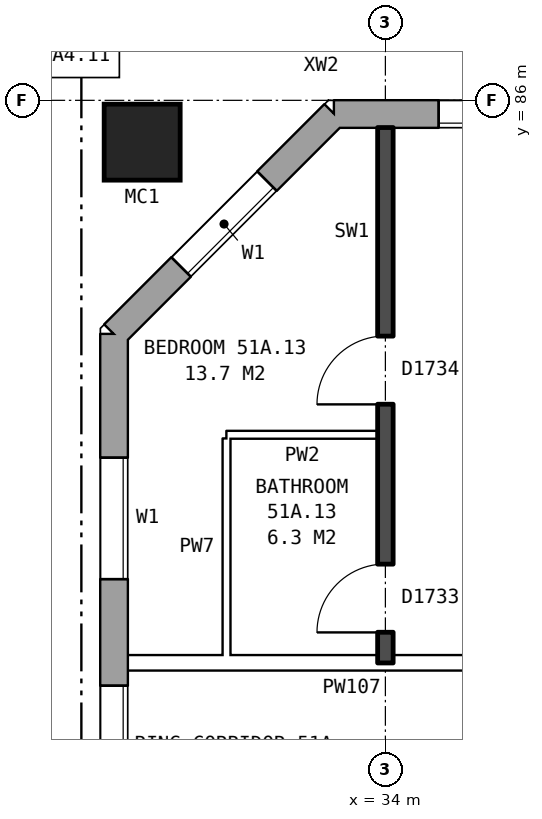
"""IFC4 building model, lengths in metres.
Left out: names, types, materials, properties, quantities, classifications, styles, units other than length and angle.
Written with IfcOpenShell. Run it as: python <this file> out.ifc"""

import sys

from ifc_helpers import new_model, si_unit, direction, frame, frame_2d, origin, origin_2d, place, context, subcontext, project, spatial, rectangle, hollow_rectangle, extrude, element, fill, save


model = new_model("IFC4")
c1 = context("Model", 3, precision=1e-05, world=origin(), true_north=direction((0.0, 1.0)))
c2 = subcontext(c1, "Body", "Model", "MODEL_VIEW")
j1 = project(units=[si_unit("LENGTHUNIT", "METRE"), si_unit("PLANEANGLEUNIT", "RADIAN")], contexts=[c1])
p1 = place(None, origin())
s1 = spatial("IfcSite", under=j1, at=p1, CompositionType="ELEMENT")
p2 = place(p1, origin())
s2 = spatial("IfcBuilding", under=s1, at=p2, CompositionType="ELEMENT")
p3 = place(p2, frame((0.0, 0.0, 182.0)))
s3 = spatial("IfcBuildingStorey", under=s2, at=p3, CompositionType="ELEMENT", Elevation=182.0)
p4 = place(p3, frame((30.8, 85.45, 0.0), z_axis=(0.0, 0.0, 1.0), x_axis=(1.0, 0.0, 0.0)))
e1 = element("IfcColumn", 1, at=p4, inside=s3, PredefinedType="COLUMN", context=c2, shape_type="SweptSolid", body=[
    extrude(hollow_rectangle(XDim=1.0, YDim=1.0, WallThickness=0.055, at=origin_2d()), origin(), (0.0, 0.0, 1.0), 3.1),
])
p5 = place(p3, frame((72.925, 85.82, 0.0), z_axis=(0.0, 0.0, 1.0), x_axis=(-1.0, 0.0, 0.0)))
e2 = element("IfcWall", 2, at=p5, inside=s3, PredefinedType="STANDARD", context=c2, shape_type="SweptSolid", body=[
    extrude(rectangle(XDim=39.601, YDim=0.36, at=frame_2d((19.8, 0.0))), origin(), (0.0, 0.0, 1.0), 2.85),
])
p6 = place(p5, frame((0.625, 0.0, 0.8)))
e3 = element("IfcOpeningElement", 3, at=p6, cuts=e2, PredefinedType="OPENING", context=c2, shape_type="SweptSolid", body=[
    extrude(rectangle(XDim=1.6, YDim=1.8, at=frame_2d((0.8, 0.9))), frame((0.0, 0.19, 0.0), z_axis=(0.0, -1.0, 0.0), x_axis=(1.0, 0.0, 0.0)), (0.0, 0.0, 1.0), 0.38),
])
p7 = place(p5, frame((3.625, 0.0, 0.8)))
e4 = element("IfcOpeningElement", 4, at=p7, cuts=e2, PredefinedType="OPENING", context=c2, shape_type="SweptSolid", body=[
    extrude(rectangle(XDim=1.6, YDim=1.8, at=frame_2d((0.8, 0.9))), frame((0.0, 0.19, 0.0), z_axis=(0.0, -1.0, 0.0), x_axis=(1.0, 0.0, 0.0)), (0.0, 0.0, 1.0), 0.38),
])
p8 = place(p5, frame((6.625, 0.0, 0.8)))
e5 = element("IfcOpeningElement", 5, at=p8, cuts=e2, PredefinedType="OPENING", context=c2, shape_type="SweptSolid", body=[
    extrude(rectangle(XDim=1.6, YDim=1.8, at=frame_2d((0.8, 0.9))), frame((0.0, 0.19, 0.0), z_axis=(0.0, -1.0, 0.0), x_axis=(1.0, 0.0, 0.0)), (0.0, 0.0, 1.0), 0.38),
])
p9 = place(p5, frame((9.475, 0.0, 0.35)))
e6 = element("IfcOpeningElement", 6, at=p9, cuts=e2, PredefinedType="OPENING", context=c2, shape_type="SweptSolid", body=[
    extrude(rectangle(XDim=0.6, YDim=0.9, at=frame_2d((0.3, 0.45))), frame((0.0, 0.19, 0.0), z_axis=(0.0, -1.0, 0.0), x_axis=(1.0, 0.0, 0.0)), (0.0, 0.0, 1.0), 0.38),
])
p10 = place(p5, frame((12.625, 0.0, 0.8)))
e7 = element("IfcOpeningElement", 7, at=p10, cuts=e2, PredefinedType="OPENING", context=c2, shape_type="SweptSolid", body=[
    extrude(rectangle(XDim=1.6, YDim=1.8, at=frame_2d((0.8, 0.9))), frame((0.0, 0.19, 0.0), z_axis=(0.0, -1.0, 0.0), x_axis=(1.0, 0.0, 0.0)), (0.0, 0.0, 1.0), 0.38),
])
p11 = place(p5, frame((15.625, 0.0, 0.8)))
e8 = element("IfcOpeningElement", 8, at=p11, cuts=e2, PredefinedType="OPENING", context=c2, shape_type="SweptSolid", body=[
    extrude(rectangle(XDim=1.6, YDim=1.8, at=frame_2d((0.8, 0.9))), frame((0.0, 0.19, 0.0), z_axis=(0.0, -1.0, 0.0), x_axis=(1.0, 0.0, 0.0)), (0.0, 0.0, 1.0), 0.38),
])
p12 = place(p5, frame((18.625, 0.0, 0.8)))
e9 = element("IfcOpeningElement", 9, at=p12, cuts=e2, PredefinedType="OPENING", context=c2, shape_type="SweptSolid", body=[
    extrude(rectangle(XDim=1.6, YDim=1.8, at=frame_2d((0.8, 0.9))), frame((0.0, 0.19, 0.0), z_axis=(0.0, -1.0, 0.0), x_axis=(1.0, 0.0, 0.0)), (0.0, 0.0, 1.0), 0.38),
])
p13 = place(p5, frame((21.625, 0.0, 0.8)))
e10 = element("IfcOpeningElement", 10, at=p13, cuts=e2, PredefinedType="OPENING", context=c2, shape_type="SweptSolid", body=[
    extrude(rectangle(XDim=1.6, YDim=1.8, at=frame_2d((0.8, 0.9))), frame((0.0, 0.19, 0.0), z_axis=(0.0, -1.0, 0.0), x_axis=(1.0, 0.0, 0.0)), (0.0, 0.0, 1.0), 0.38),
])
p14 = place(p5, frame((24.625, 0.0, 0.8)))
e11 = element("IfcOpeningElement", 11, at=p14, cuts=e2, PredefinedType="OPENING", context=c2, shape_type="SweptSolid", body=[
    extrude(rectangle(XDim=1.6, YDim=1.8, at=frame_2d((0.8, 0.9))), frame((0.0, 0.19, 0.0), z_axis=(0.0, -1.0, 0.0), x_axis=(1.0, 0.0, 0.0)), (0.0, 0.0, 1.0), 0.38),
])
p15 = place(p5, frame((27.125, 0.0, 0.8)))
e12 = element("IfcOpeningElement", 12, at=p15, cuts=e2, PredefinedType="OPENING", context=c2, shape_type="SweptSolid", body=[
    extrude(rectangle(XDim=1.6, YDim=1.8, at=frame_2d((0.8, 0.9))), frame((0.0, 0.19, 0.0), z_axis=(0.0, -1.0, 0.0), x_axis=(1.0, 0.0, 0.0)), (0.0, 0.0, 1.0), 0.38),
])
p16 = place(p5, frame((29.025, 0.0, 0.8)))
e13 = element("IfcOpeningElement", 13, at=p16, cuts=e2, PredefinedType="OPENING", context=c2, shape_type="SweptSolid", body=[
    extrude(rectangle(XDim=0.6, YDim=0.9, at=frame_2d((0.3, 0.45))), frame((0.0, 0.19, 0.0), z_axis=(0.0, -1.0, 0.0), x_axis=(1.0, 0.0, 0.0)), (0.0, 0.0, 1.0), 0.38),
])
p17 = place(p5, frame((33.625, 0.0, 0.8)))
e14 = element("IfcOpeningElement", 14, at=p17, cuts=e2, PredefinedType="OPENING", context=c2, shape_type="SweptSolid", body=[
    extrude(rectangle(XDim=1.6, YDim=1.8, at=frame_2d((0.8, 0.9))), frame((0.0, 0.19, 0.0), z_axis=(0.0, -1.0, 0.0), x_axis=(1.0, 0.0, 0.0)), (0.0, 0.0, 1.0), 0.38),
])
p18 = place(p5, frame((36.625, 0.0, 0.8)))
e15 = element("IfcOpeningElement", 15, at=p18, cuts=e2, PredefinedType="OPENING", context=c2, shape_type="SweptSolid", body=[
    extrude(rectangle(XDim=1.6, YDim=1.8, at=frame_2d((0.8, 0.9))), frame((0.0, 0.19, 0.0), z_axis=(0.0, -1.0, 0.0), x_axis=(1.0, 0.0, 0.0)), (0.0, 0.0, 1.0), 0.38),
])
p19 = place(p5, frame((10.375, 0.0, 0.35)))
e16 = element("IfcOpeningElement", 16, at=p19, cuts=e2, PredefinedType="OPENING", context=c2, shape_type="SweptSolid", body=[
    extrude(rectangle(XDim=1.4, YDim=1.8, at=frame_2d((0.7, 0.9))), frame((0.0, 0.19, 0.0), z_axis=(0.0, -1.0, 0.0), x_axis=(1.0, 0.0, 0.0)), (0.0, 0.0, 1.0), 0.38),
])
p20 = place(p5, frame((30.775, 0.0, 1.7)))
e17 = element("IfcOpeningElement", 17, at=p20, cuts=e2, PredefinedType="OPENING", context=c2, shape_type="SweptSolid", body=[
    extrude(rectangle(XDim=0.6, YDim=0.9, at=frame_2d((0.3, 0.45))), frame((0.0, 0.19, 0.0), z_axis=(0.0, -1.0, 0.0), x_axis=(1.0, 0.0, 0.0)), (0.0, 0.0, 1.0), 0.38),
])
p21 = place(p5, frame((31.675, 0.0, 0.8)))
e18 = element("IfcOpeningElement", 18, at=p21, cuts=e2, PredefinedType="OPENING", context=c2, shape_type="SweptSolid", body=[
    extrude(rectangle(XDim=1.0, YDim=1.8, at=frame_2d((0.5, 0.9))), frame((0.0, 0.19, 0.0), z_axis=(0.0, -1.0, 0.0), x_axis=(1.0, 0.0, 0.0)), (0.0, 0.0, 1.0), 0.38),
])
p22 = place(p3, frame((33.325, 85.82, 0.0), z_axis=(0.0, 0.0, 1.0), x_axis=(-0.707106781187, -0.707106781187, 0.0)))
e19 = element("IfcWall", 19, at=p22, inside=s3, PredefinedType="STANDARD", context=c2, shape_type="SweptSolid", body=[
    extrude(rectangle(XDim=4.094, YDim=0.36, at=frame_2d((2.047, 0.0))), origin(), (0.0, 0.0, 1.0), 2.85),
])
p23 = place(p22, frame((1.247, 0.0, 0.8)))
e20 = element("IfcOpeningElement", 20, at=p23, cuts=e19, PredefinedType="OPENING", context=c2, shape_type="SweptSolid", body=[
    extrude(rectangle(XDim=1.6, YDim=1.8, at=frame_2d((0.8, 0.9))), frame((0.0, 0.19, 0.0), z_axis=(0.0, -1.0, 0.0), x_axis=(1.0, 0.0, 0.0)), (0.0, 0.0, 1.0), 0.38),
])
p24 = place(p3, frame((30.43, 82.925, 0.0), z_axis=(0.0, 0.0, 1.0), x_axis=(0.0, -1.0, 0.0)))
e21 = element("IfcWall", 21, at=p24, inside=s3, PredefinedType="STANDARD", context=c2, shape_type="SweptSolid", body=[
    extrude(rectangle(XDim=25.851, YDim=0.36, at=frame_2d((12.925, 0.0))), origin(), (0.0, 0.0, 1.0), 2.85),
])
p25 = place(p24, frame((1.625, 0.0, 0.8)))
e22 = element("IfcOpeningElement", 22, at=p25, cuts=e21, PredefinedType="OPENING", context=c2, shape_type="SweptSolid", body=[
    extrude(rectangle(XDim=1.6, YDim=1.8, at=frame_2d((0.8, 0.9))), frame((0.0, 0.19, 0.0), z_axis=(0.0, -1.0, 0.0), x_axis=(1.0, 0.0, 0.0)), (0.0, 0.0, 1.0), 0.38),
])
p26 = place(p24, frame((4.625, 0.0, 0.8)))
e23 = element("IfcOpeningElement", 23, at=p26, cuts=e21, PredefinedType="OPENING", context=c2, shape_type="SweptSolid", body=[
    extrude(rectangle(XDim=1.6, YDim=1.8, at=frame_2d((0.8, 0.9))), frame((0.0, 0.19, 0.0), z_axis=(0.0, -1.0, 0.0), x_axis=(1.0, 0.0, 0.0)), (0.0, 0.0, 1.0), 0.38),
])
p27 = place(p24, frame((7.625, 0.0, 0.8)))
e24 = element("IfcOpeningElement", 24, at=p27, cuts=e21, PredefinedType="OPENING", context=c2, shape_type="SweptSolid", body=[
    extrude(rectangle(XDim=1.6, YDim=1.8, at=frame_2d((0.8, 0.9))), frame((0.0, 0.19, 0.0), z_axis=(0.0, -1.0, 0.0), x_axis=(1.0, 0.0, 0.0)), (0.0, 0.0, 1.0), 0.38),
])
p28 = place(p24, frame((6.525, 0.0, 0.8)))
e25 = element("IfcOpeningElement", 25, at=p28, cuts=e21, PredefinedType="OPENING", context=c2, shape_type="SweptSolid", body=[
    extrude(rectangle(XDim=0.8, YDim=1.8, at=frame_2d((0.4, 0.9))), frame((0.0, 0.19, 0.0), z_axis=(0.0, -1.0, 0.0), x_axis=(1.0, 0.0, 0.0)), (0.0, 0.0, 1.0), 0.38),
])
p29 = place(p24, frame((9.525, 0.0, 0.8)))
e26 = element("IfcOpeningElement", 26, at=p29, cuts=e21, PredefinedType="OPENING", context=c2, shape_type="SweptSolid", body=[
    extrude(rectangle(XDim=1.4, YDim=1.2, at=frame_2d((0.7, 0.6))), frame((0.0, 0.19, 0.0), z_axis=(0.0, -1.0, 0.0), x_axis=(1.0, 0.0, 0.0)), (0.0, 0.0, 1.0), 0.38),
])
p30 = place(p24, frame((16.625, 0.0, 0.8)))
e27 = element("IfcOpeningElement", 27, at=p30, cuts=e21, PredefinedType="OPENING", context=c2, shape_type="SweptSolid", body=[
    extrude(rectangle(XDim=1.6, YDim=1.8, at=frame_2d((0.8, 0.9))), frame((0.0, 0.19, 0.0), z_axis=(0.0, -1.0, 0.0), x_axis=(1.0, 0.0, 0.0)), (0.0, 0.0, 1.0), 0.38),
])
p31 = place(p24, frame((19.625, 0.0, 0.8)))
e28 = element("IfcOpeningElement", 28, at=p31, cuts=e21, PredefinedType="OPENING", context=c2, shape_type="SweptSolid", body=[
    extrude(rectangle(XDim=1.6, YDim=1.8, at=frame_2d((0.8, 0.9))), frame((0.0, 0.19, 0.0), z_axis=(0.0, -1.0, 0.0), x_axis=(1.0, 0.0, 0.0)), (0.0, 0.0, 1.0), 0.38),
])
p32 = place(p24, frame((22.625, 0.0, 0.8)))
e29 = element("IfcOpeningElement", 29, at=p32, cuts=e21, PredefinedType="OPENING", context=c2, shape_type="SweptSolid", body=[
    extrude(rectangle(XDim=1.6, YDim=1.8, at=frame_2d((0.8, 0.9))), frame((0.0, 0.19, 0.0), z_axis=(0.0, -1.0, 0.0), x_axis=(1.0, 0.0, 0.0)), (0.0, 0.0, 1.0), 0.38),
])
p33 = place(p24, frame((12.275, 0.0, 0.8)))
e30 = element("IfcOpeningElement", 30, at=p33, cuts=e21, PredefinedType="OPENING", context=c2, shape_type="SweptSolid", body=[
    extrude(rectangle(XDim=1.2, YDim=1.8, at=frame_2d((0.6, 0.9))), frame((0.0, 0.19, 0.0), z_axis=(0.0, -1.0, 0.0), x_axis=(1.0, 0.0, 0.0)), (0.0, 0.0, 1.0), 0.38),
])
p34 = place(p24, frame((14.425, 0.0, 0.8)))
e31 = element("IfcOpeningElement", 31, at=p34, cuts=e21, PredefinedType="OPENING", context=c2, shape_type="SweptSolid", body=[
    extrude(rectangle(XDim=1.2, YDim=0.9, at=frame_2d((0.6, 0.45))), frame((0.0, 0.19, 0.0), z_axis=(0.0, -1.0, 0.0), x_axis=(1.0, 0.0, 0.0)), (0.0, 0.0, 1.0), 0.38),
])
p35 = place(p24, frame((18.525, 0.0, 0.8)))
e32 = element("IfcOpeningElement", 32, at=p35, cuts=e21, PredefinedType="OPENING", context=c2, shape_type="SweptSolid", body=[
    extrude(rectangle(XDim=0.6, YDim=1.8, at=frame_2d((0.3, 0.9))), frame((0.0, 0.19, 0.0), z_axis=(0.0, -1.0, 0.0), x_axis=(1.0, 0.0, 0.0)), (0.0, 0.0, 1.0), 0.38),
])
p36 = place(p3, frame((30.61, 78.6, 0.0), z_axis=(0.0, 0.0, 1.0), x_axis=(1.0, 0.0, 0.0)))
e33 = element("IfcWall", 33, at=p36, inside=s3, PredefinedType="PARTITIONING", context=c2, shape_type="SweptSolid", body=[
    extrude(rectangle(XDim=15.29, YDim=0.2, at=frame_2d((7.645, 0.0))), origin(), (0.0, 0.0, 1.0), 2.85),
])
p37 = place(p36, frame((10.69, 0.0, 0.0)))
e34 = element("IfcOpeningElement", 34, at=p37, cuts=e33, PredefinedType="OPENING", context=c2, shape_type="SweptSolid", body=[
    extrude(rectangle(XDim=1.0, YDim=2.1, at=frame_2d((0.5, 1.05))), frame((0.0, 0.11, 0.0), z_axis=(0.0, -1.0, 0.0), x_axis=(1.0, 0.0, 0.0)), (0.0, 0.0, 1.0), 0.22),
])
p38 = place(p36, frame((5.89, 0.0, 0.0)))
e35 = element("IfcOpeningElement", 35, at=p38, cuts=e33, PredefinedType="OPENING", context=c2, shape_type="SweptSolid", body=[
    extrude(rectangle(XDim=1.0, YDim=2.1, at=frame_2d((0.5, 1.05))), frame((0.0, 0.11, 0.0), z_axis=(0.0, -1.0, 0.0), x_axis=(1.0, 0.0, 0.0)), (0.0, 0.0, 1.0), 0.22),
])
p39 = place(p3, frame((31.91, 81.6, 0.0), z_axis=(0.0, 0.0, 1.0), x_axis=(1.0, 0.0, 0.0)))
e36 = element("IfcWall", 36, at=p39, inside=s3, PredefinedType="PARTITIONING", context=c2, shape_type="SweptSolid", body=[
    extrude(rectangle(XDim=1.99, YDim=0.1, at=frame_2d((0.995, 0.0))), origin(), (0.0, 0.0, 1.0), 2.85),
])
p40 = place(p3, frame((31.91, 78.7, 0.0), z_axis=(0.0, 0.0, 1.0), x_axis=(0.0, 1.0, 0.0)))
e37 = element("IfcWall", 37, at=p40, inside=s3, PredefinedType="PARTITIONING", context=c2, shape_type="SweptSolid", body=[
    extrude(rectangle(XDim=2.85, YDim=0.1, at=frame_2d((1.425, 0.0))), origin(), (0.0, 0.0, 1.0), 2.85),
])
p41 = place(p3, frame((34.0, 78.6, 0.0), z_axis=(0.0, 0.0, 1.0), x_axis=(0.0, 1.0, 0.0)))
e38 = element("IfcWall", 38, at=p41, inside=s3, PredefinedType="SOLIDWALL", context=c2, shape_type="SweptSolid", body=[
    extrude(rectangle(XDim=7.04, YDim=0.2, at=frame_2d((3.52, 0.0))), origin(), (0.0, 0.0, 1.0), 2.85),
])
p42 = place(p41, frame((3.4, 0.0, 0.0)))
e39 = element("IfcOpeningElement", 39, at=p42, cuts=e38, PredefinedType="OPENING", context=c2, shape_type="SweptSolid", body=[
    extrude(rectangle(XDim=0.9, YDim=2.1, at=frame_2d((0.45, 1.05))), frame((0.0, 0.11, 0.0), z_axis=(0.0, -1.0, 0.0), x_axis=(1.0, 0.0, 0.0)), (0.0, 0.0, 1.0), 0.22),
])
p43 = place(p41, frame((0.4, 0.0, 0.0)))
e40 = element("IfcOpeningElement", 40, at=p43, cuts=e38, PredefinedType="OPENING", context=c2, shape_type="SweptSolid", body=[
    extrude(rectangle(XDim=0.9, YDim=2.1, at=frame_2d((0.45, 1.05))), frame((0.0, 0.11, 0.0), z_axis=(0.0, -1.0, 0.0), x_axis=(1.0, 0.0, 0.0)), (0.0, 0.0, 1.0), 0.22),
])
p44 = place(p18, origin())
e41 = element("IfcWindow", 41, at=p44, inside=s3, PartitioningType="SINGLE_PANEL", PredefinedType="WINDOW", context=c2, shape_type="SweptSolid", body=[
    extrude(rectangle(XDim=1.6, YDim=1.8, at=frame_2d((0.8, 0.9))), frame((0.0, 0.15, 0.0), z_axis=(0.0, -1.0, 0.0), x_axis=(1.0, 0.0, 0.0)), (0.0, 0.0, 1.0), 0.06),
])
fill(e15, e41)
p45 = place(p23, origin())
e42 = element("IfcWindow", 42, at=p45, inside=s3, PartitioningType="SINGLE_PANEL", PredefinedType="WINDOW", context=c2, shape_type="SweptSolid", body=[
    extrude(rectangle(XDim=1.6, YDim=1.8, at=frame_2d((0.8, 0.9))), frame((0.0, 0.15, 0.0), z_axis=(0.0, -1.0, 0.0), x_axis=(1.0, 0.0, 0.0)), (0.0, 0.0, 1.0), 0.06),
])
fill(e20, e42)
p46 = place(p25, origin())
e43 = element("IfcWindow", 43, at=p46, inside=s3, PartitioningType="SINGLE_PANEL", PredefinedType="WINDOW", context=c2, shape_type="SweptSolid", body=[
    extrude(rectangle(XDim=1.6, YDim=1.8, at=frame_2d((0.8, 0.9))), frame((0.0, 0.15, 0.0), z_axis=(0.0, -1.0, 0.0), x_axis=(1.0, 0.0, 0.0)), (0.0, 0.0, 1.0), 0.06),
])
fill(e22, e43)
p47 = place(p26, origin())
e44 = element("IfcWindow", 44, at=p47, inside=s3, PartitioningType="SINGLE_PANEL", PredefinedType="WINDOW", context=c2, shape_type="SweptSolid", body=[
    extrude(rectangle(XDim=1.6, YDim=1.8, at=frame_2d((0.8, 0.9))), frame((0.0, 0.15, 0.0), z_axis=(0.0, -1.0, 0.0), x_axis=(1.0, 0.0, 0.0)), (0.0, 0.0, 1.0), 0.06),
])
fill(e23, e44)
p48 = place(p42, origin())
e45 = element("IfcDoor", 45, at=p48, inside=s3, OperationType="SINGLE_SWING_LEFT", PredefinedType="DOOR", context=c2, shape_type="SweptSolid", body=[
    extrude(rectangle(XDim=0.9, YDim=2.1, at=frame_2d((0.45, 1.05))), frame((0.0, 0.025, 0.0), z_axis=(0.0, -1.0, 0.0), x_axis=(1.0, 0.0, 0.0)), (0.0, 0.0, 1.0), 0.05),
])
fill(e39, e45)
p49 = place(p43, origin())
e46 = element("IfcDoor", 46, at=p49, inside=s3, OperationType="SINGLE_SWING_LEFT", PredefinedType="DOOR", context=c2, shape_type="SweptSolid", body=[
    extrude(rectangle(XDim=0.9, YDim=2.1, at=frame_2d((0.45, 1.05))), frame((0.0, 0.025, 0.0), z_axis=(0.0, -1.0, 0.0), x_axis=(1.0, 0.0, 0.0)), (0.0, 0.0, 1.0), 0.05),
])
fill(e40, e46)
save(model, sys.argv[1])
